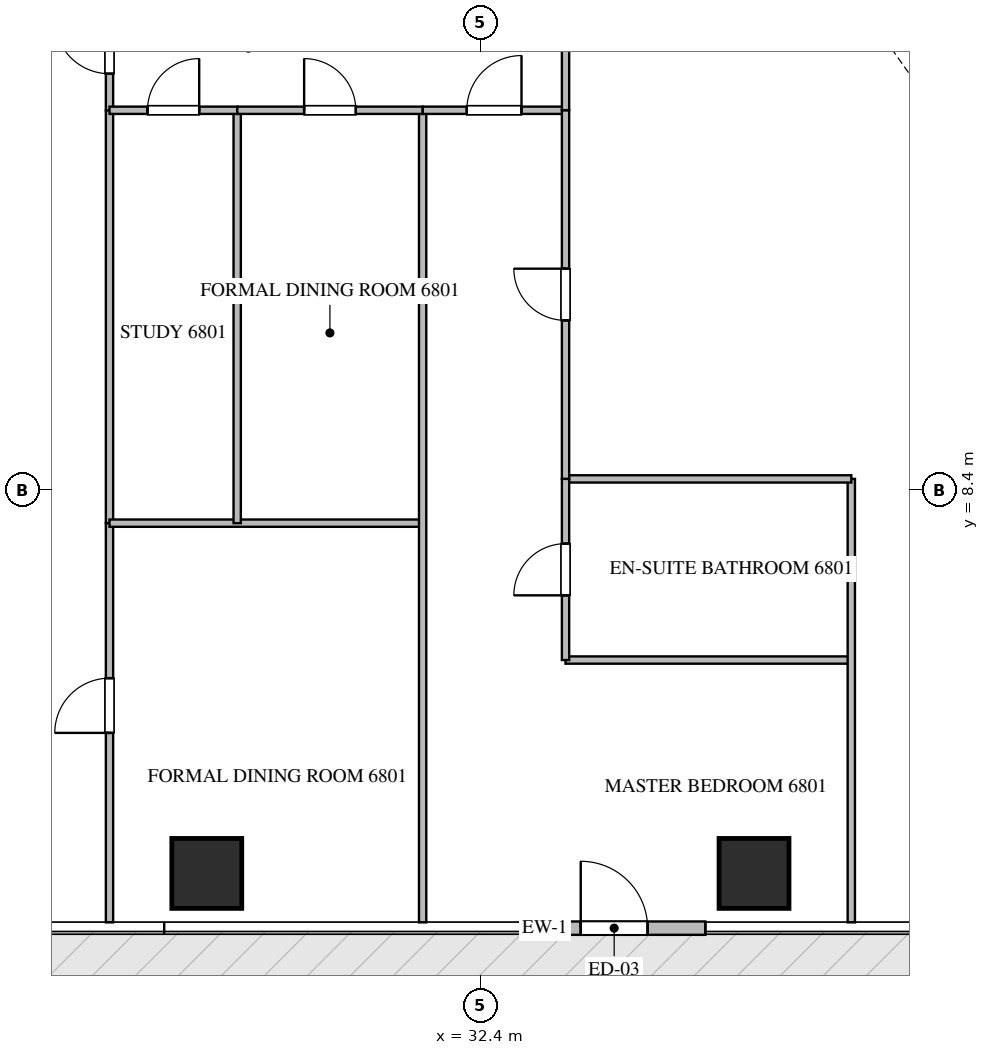
"""IFC4 building model, lengths in metres.
Left out: names, types, materials, properties, quantities, classifications, styles, units other than length and angle.
Written with IfcOpenShell. Run it as: python <this file> out.ifc"""

import sys

from ifc_helpers import new_model, si_unit, direction, frame, frame_2d, origin, origin_2d, place, context, subcontext, project, spatial, rectangle, extrude, source, transform, mapped, element, fill, save


model = new_model("IFC4")
c1 = context("Model", 3, precision=1e-05, world=origin(), true_north=direction((0.0, 1.0)))
c2 = subcontext(c1, "Body", "Model", "MODEL_VIEW")
j1 = project(units=[si_unit("LENGTHUNIT", "METRE"), si_unit("PLANEANGLEUNIT", "RADIAN")], contexts=[c1])
p1 = place(None, origin())
s1 = spatial("IfcSite", under=j1, at=p1, CompositionType="ELEMENT")
p2 = place(p1, origin())
s2 = spatial("IfcBuilding", under=s1, at=p2, CompositionType="ELEMENT")
p3 = place(p2, frame((0.0, 0.0, 272.05)))
s3 = spatial("IfcBuildingStorey", under=s2, at=p3, CompositionType="ELEMENT", Elevation=272.05)
m1 = source(origin(), c2, "Body", "SweptSolid", [
    extrude(rectangle(XDim=1.15, YDim=1.15, at=origin_2d()), origin(), (0.0, 0.0, 1.0), 3.85),
])
for number, where, z_axis, x_axis in (
    (1, (27.9, 2.1, -0.26), (0.0, 0.0, 1.0), (1.0, 0.0, 0.0)),
    (2, (36.9, 2.1, -0.26), (0.0, 0.0, 1.0), (1.0, 0.0, 0.0)),
):
    element("IfcColumn", number, at=place(p3, frame(where, z_axis=z_axis, x_axis=x_axis)), inside=s3, PredefinedType="COLUMN", context=c2, shape_type="MappedRepresentation", body=[
        mapped(m1, transform((0.0, 0.0, 0.0), scale=1.0)),
    ])
p4 = place(p3, frame((33.1, 1.2, 0.0), z_axis=(0.0, 0.0, 1.0), x_axis=(1.0, 0.0, 0.0)))
e3 = element("IfcWall", 3, at=p4, inside=s3, PredefinedType="ELEMENTEDWALL", context=c2, shape_type="SweptSolid", body=[
    extrude(rectangle(XDim=3.0, YDim=0.22, at=frame_2d((1.5, 0.0))), origin(), (0.0, 0.0, 1.0), 3.575),
])
p5 = place(p4, frame((0.95, 0.0, 0.0)))
e4 = element("IfcOpeningElement", 4, at=p5, cuts=e3, PredefinedType="OPENING", context=c2, shape_type="SweptSolid", body=[
    extrude(rectangle(XDim=1.1, YDim=2.2, at=frame_2d((0.55, 1.1))), frame((0.0, 0.12, 0.0), z_axis=(0.0, -1.0, 0.0), x_axis=(1.0, 0.0, 0.0)), (0.0, 0.0, 1.0), 0.24),
])
p6 = place(p3, frame((26.3, 14.65, 0.0), z_axis=(0.0, 0.0, 1.0), x_axis=(0.0, 1.0, 0.0)))
e5 = element("IfcWall", 5, at=p6, inside=s3, PredefinedType="PARTITIONING", context=c2, shape_type="SweptSolid", body=[
    extrude(rectangle(XDim=1.975, YDim=0.12, at=frame_2d((0.988, 0.0))), origin(), (0.0, 0.0, 1.0), 3.59),
])
p7 = place(p6, frame((0.601, 0.0, 0.0)))
e6 = element("IfcOpeningElement", 6, at=p7, cuts=e5, PredefinedType="OPENING", context=c2, shape_type="SweptSolid", body=[
    extrude(rectangle(XDim=0.9, YDim=2.1, at=frame_2d((0.45, 1.05))), frame((0.0, 0.07, 0.0), z_axis=(0.0, -1.0, 0.0), x_axis=(1.0, 0.0, 0.0)), (0.0, 0.0, 1.0), 0.14),
])
p8 = place(p3, frame((26.3, 1.295, 0.0), z_axis=(0.0, 0.0, 1.0), x_axis=(0.0, 1.0, 0.0)))
e7 = element("IfcWall", 7, at=p8, inside=s3, PredefinedType="PARTITIONING", context=c2, shape_type="SweptSolid", body=[
    extrude(rectangle(XDim=6.565, YDim=0.12, at=frame_2d((3.283, 0.0))), origin(), (0.0, 0.0, 1.0), 3.59),
])
p9 = place(p8, frame((3.116, 0.0, 0.0)))
e8 = element("IfcOpeningElement", 8, at=p9, cuts=e7, PredefinedType="OPENING", context=c2, shape_type="SweptSolid", body=[
    extrude(rectangle(XDim=0.9, YDim=2.1, at=frame_2d((0.45, 1.05))), frame((0.0, 0.07, 0.0), z_axis=(0.0, -1.0, 0.0), x_axis=(1.0, 0.0, 0.0)), (0.0, 0.0, 1.0), 0.14),
])
p10 = place(p3, frame((26.3, 7.862, 0.0), z_axis=(0.0, 0.0, 1.0), x_axis=(0.0, 1.0, 0.0)))
e9 = element("IfcWall", 9, at=p10, inside=s3, PredefinedType="PARTITIONING", context=c2, shape_type="SweptSolid", body=[
    extrude(rectangle(XDim=6.786, YDim=0.12, at=frame_2d((3.393, 0.0))), origin(), (0.0, 0.0, 1.0), 3.59),
])
p11 = place(p3, frame((26.3, 7.86, 0.0), z_axis=(0.0, 0.0, 1.0), x_axis=(1.0, 0.0, 0.0)))
e10 = element("IfcWall", 10, at=p11, inside=s3, PredefinedType="PARTITIONING", context=c2, shape_type="SweptSolid", body=[
    extrude(rectangle(XDim=5.15, YDim=0.12, at=frame_2d((2.575, 0.0))), origin(), (0.0, 0.0, 1.0), 3.59),
])
p12 = place(p3, frame((31.45, 1.295, 0.0), z_axis=(0.0, 0.0, 1.0), x_axis=(0.0, 1.0, 0.0)))
e11 = element("IfcWall", 11, at=p12, inside=s3, PredefinedType="PARTITIONING", context=c2, shape_type="SweptSolid", body=[
    extrude(rectangle(XDim=13.355, YDim=0.12, at=frame_2d((6.677, 0.0))), origin(), (0.0, 0.0, 1.0), 3.59),
])
p13 = place(p3, frame((28.4, 7.86, 0.0), z_axis=(0.0, 0.0, 1.0), x_axis=(0.0, 1.0, 0.0)))
e12 = element("IfcWall", 12, at=p13, inside=s3, PredefinedType="PARTITIONING", context=c2, shape_type="SweptSolid", body=[
    extrude(rectangle(XDim=6.79, YDim=0.12, at=frame_2d((3.395, 0.0))), origin(), (0.0, 0.0, 1.0), 3.59),
])
p14 = place(p3, frame((26.3, 14.65, 0.0), z_axis=(0.0, 0.0, 1.0), x_axis=(1.0, 0.0, 0.0)))
e13 = element("IfcWall", 13, at=p14, inside=s3, PredefinedType="PARTITIONING", context=c2, shape_type="SweptSolid", body=[
    extrude(rectangle(XDim=2.1, YDim=0.12, at=frame_2d((1.05, 0.0))), origin(), (0.0, 0.0, 1.0), 3.59),
])
p15 = place(p14, frame((0.625, 0.0, 0.0)))
e14 = element("IfcOpeningElement", 14, at=p15, cuts=e13, PredefinedType="OPENING", context=c2, shape_type="SweptSolid", body=[
    extrude(rectangle(XDim=0.85, YDim=2.1, at=frame_2d((0.425, 1.05))), frame((0.0, 0.07, 0.0), z_axis=(0.0, -1.0, 0.0), x_axis=(1.0, 0.0, 0.0)), (0.0, 0.0, 1.0), 0.14),
])
p16 = place(p3, frame((28.402, 14.65, 0.0), z_axis=(0.0, 0.0, 1.0), x_axis=(1.0, 0.0, 0.0)))
e15 = element("IfcWall", 15, at=p16, inside=s3, PredefinedType="PARTITIONING", context=c2, shape_type="SweptSolid", body=[
    extrude(rectangle(XDim=3.048, YDim=0.12, at=frame_2d((1.524, 0.0))), origin(), (0.0, 0.0, 1.0), 3.59),
])
p17 = place(p16, frame((1.099, 0.0, 0.0)))
e16 = element("IfcOpeningElement", 16, at=p17, cuts=e15, PredefinedType="OPENING", context=c2, shape_type="SweptSolid", body=[
    extrude(rectangle(XDim=0.85, YDim=2.1, at=frame_2d((0.425, 1.05))), frame((0.0, 0.07, 0.0), z_axis=(0.0, -1.0, 0.0), x_axis=(1.0, 0.0, 0.0)), (0.0, 0.0, 1.0), 0.14),
])
p18 = place(p3, frame((31.452, 14.65, 0.0), z_axis=(0.0, 0.0, 1.0), x_axis=(1.0, 0.0, 0.0)))
e17 = element("IfcWall", 17, at=p18, inside=s3, PredefinedType="PARTITIONING", context=c2, shape_type="SweptSolid", body=[
    extrude(rectangle(XDim=2.348, YDim=0.12, at=frame_2d((1.174, 0.0))), origin(), (0.0, 0.0, 1.0), 3.59),
])
p19 = place(p18, frame((0.724, 0.0, 0.0)))
e18 = element("IfcOpeningElement", 18, at=p19, cuts=e17, PredefinedType="OPENING", context=c2, shape_type="SweptSolid", body=[
    extrude(rectangle(XDim=0.9, YDim=2.1, at=frame_2d((0.45, 1.05))), frame((0.0, 0.07, 0.0), z_axis=(0.0, -1.0, 0.0), x_axis=(1.0, 0.0, 0.0)), (0.0, 0.0, 1.0), 0.14),
])
p20 = place(p3, frame((33.8, 5.609, 0.0), z_axis=(0.0, 0.0, 1.0), x_axis=(1.0, 0.0, 0.0)))
e19 = element("IfcWall", 19, at=p20, inside=s3, PredefinedType="PARTITIONING", context=c2, shape_type="SweptSolid", body=[
    extrude(rectangle(XDim=4.7, YDim=0.12, at=frame_2d((2.35, 0.0))), origin(), (0.0, 0.0, 1.0), 3.59),
])
p21 = place(p3, frame((38.5, 1.295, 0.0), z_axis=(0.0, 0.0, 1.0), x_axis=(0.0, 1.0, 0.0)))
e20 = element("IfcWall", 20, at=p21, inside=s3, PredefinedType="PARTITIONING", context=c2, shape_type="SweptSolid", body=[
    extrude(rectangle(XDim=7.293, YDim=0.12, at=frame_2d((3.646, 0.0))), origin(), (0.0, 0.0, 1.0), 3.59),
])
p22 = place(p3, frame((33.8, 8.588, 0.0), z_axis=(0.0, 0.0, 1.0), x_axis=(1.0, 0.0, 0.0)))
e21 = element("IfcWall", 21, at=p22, inside=s3, PredefinedType="PARTITIONING", context=c2, shape_type="SweptSolid", body=[
    extrude(rectangle(XDim=4.7, YDim=0.12, at=frame_2d((2.35, 0.0))), origin(), (0.0, 0.0, 1.0), 3.59),
])
p23 = place(p3, frame((33.8, 5.609, 0.0), z_axis=(0.0, 0.0, 1.0), x_axis=(0.0, 1.0, 0.0)))
e22 = element("IfcWall", 22, at=p23, inside=s3, PredefinedType="PARTITIONING", context=c2, shape_type="SweptSolid", body=[
    extrude(rectangle(XDim=2.979, YDim=0.12, at=frame_2d((1.49, 0.0))), origin(), (0.0, 0.0, 1.0), 3.59),
])
p24 = place(p23, frame((1.064, 0.0, 0.0)))
e23 = element("IfcOpeningElement", 23, at=p24, cuts=e22, PredefinedType="OPENING", context=c2, shape_type="SweptSolid", body=[
    extrude(rectangle(XDim=0.85, YDim=2.1, at=frame_2d((0.425, 1.05))), frame((0.0, 0.07, 0.0), z_axis=(0.0, -1.0, 0.0), x_axis=(1.0, 0.0, 0.0)), (0.0, 0.0, 1.0), 0.14),
])
p25 = place(p3, frame((33.8, 8.59, 0.0), z_axis=(0.0, 0.0, 1.0), x_axis=(0.0, 1.0, 0.0)))
e24 = element("IfcWall", 24, at=p25, inside=s3, PredefinedType="PARTITIONING", context=c2, shape_type="SweptSolid", body=[
    extrude(rectangle(XDim=6.06, YDim=0.12, at=frame_2d((3.03, 0.0))), origin(), (0.0, 0.0, 1.0), 3.59),
])
p26 = place(p25, frame((2.605, 0.0, 0.0)))
e25 = element("IfcOpeningElement", 25, at=p26, cuts=e24, PredefinedType="OPENING", context=c2, shape_type="SweptSolid", body=[
    extrude(rectangle(XDim=0.85, YDim=2.1, at=frame_2d((0.425, 1.05))), frame((0.0, 0.07, 0.0), z_axis=(0.0, -1.0, 0.0), x_axis=(1.0, 0.0, 0.0)), (0.0, 0.0, 1.0), 0.14),
])
p27 = place(p3, frame((33.8, 14.652, 0.0), z_axis=(0.0, 0.0, 1.0), x_axis=(0.0, 1.0, 0.0)))
e26 = element("IfcWall", 26, at=p27, inside=s3, PredefinedType="PARTITIONING", context=c2, shape_type="SweptSolid", body=[
    extrude(rectangle(XDim=1.973, YDim=0.12, at=frame_2d((0.986, 0.0))), origin(), (0.0, 0.0, 1.0), 3.59),
])
m2 = source(origin(), c2, "Body", "SweptSolid", [
    extrude(rectangle(XDim=1.1, YDim=2.2, at=frame_2d((0.55, 1.1))), frame((0.0, 0.025, 0.0), z_axis=(0.0, -1.0, 0.0), x_axis=(1.0, 0.0, 0.0)), (0.0, 0.0, 1.0), 0.05),
])
p28 = place(p5, origin())
e27 = element("IfcDoor", 27, at=p28, inside=s3, OperationType="SINGLE_SWING_LEFT", PredefinedType="DOOR", context=c2, shape_type="MappedRepresentation", body=[
    mapped(m2, transform((0.0, 0.0, 0.0), scale=1.0)),
])
fill(e4, e27)
m3 = source(origin(), c2, "Body", "SweptSolid", [
    extrude(rectangle(XDim=0.9, YDim=2.1, at=frame_2d((0.45, 1.05))), frame((0.0, 0.025, 0.0), z_axis=(0.0, -1.0, 0.0), x_axis=(1.0, 0.0, 0.0)), (0.0, 0.0, 1.0), 0.05),
])
p29 = place(p7, origin())
e28 = element("IfcDoor", 28, at=p29, inside=s3, OperationType="SINGLE_SWING_RIGHT", PredefinedType="DOOR", context=c2, shape_type="MappedRepresentation", body=[
    mapped(m3, transform((0.0, 0.0, 0.0), scale=1.0)),
])
fill(e6, e28)
p30 = place(p9, origin())
e29 = element("IfcDoor", 29, at=p30, inside=s3, OperationType="SINGLE_SWING_LEFT", PredefinedType="DOOR", context=c2, shape_type="MappedRepresentation", body=[
    mapped(m3, transform((0.0, 0.0, 0.0), scale=1.0)),
])
fill(e8, e29)
m4 = source(origin(), c2, "Body", "SweptSolid", [
    extrude(rectangle(XDim=0.85, YDim=2.1, at=frame_2d((0.425, 1.05))), frame((0.0, 0.025, 0.0), z_axis=(0.0, -1.0, 0.0), x_axis=(1.0, 0.0, 0.0)), (0.0, 0.0, 1.0), 0.05),
])
p31 = place(p15, origin())
e30 = element("IfcDoor", 30, at=p31, inside=s3, OperationType="SINGLE_SWING_RIGHT", PredefinedType="DOOR", context=c2, shape_type="MappedRepresentation", body=[
    mapped(m4, transform((0.0, 0.0, 0.0), scale=1.0)),
])
fill(e14, e30)
p32 = place(p17, origin())
e31 = element("IfcDoor", 31, at=p32, inside=s3, OperationType="SINGLE_SWING_LEFT", PredefinedType="DOOR", context=c2, shape_type="MappedRepresentation", body=[
    mapped(m4, transform((0.0, 0.0, 0.0), scale=1.0)),
])
fill(e16, e31)
p33 = place(p19, origin())
e32 = element("IfcDoor", 32, at=p33, inside=s3, OperationType="SINGLE_SWING_RIGHT", PredefinedType="DOOR", context=c2, shape_type="MappedRepresentation", body=[
    mapped(m3, transform((0.0, 0.0, 0.0), scale=1.0)),
])
fill(e18, e32)
p34 = place(p24, origin())
e33 = element("IfcDoor", 33, at=p34, inside=s3, OperationType="SINGLE_SWING_LEFT", PredefinedType="DOOR", context=c2, shape_type="MappedRepresentation", body=[
    mapped(m4, transform((0.0, 0.0, 0.0), scale=1.0)),
])
fill(e23, e33)
p35 = place(p26, origin())
e34 = element("IfcDoor", 34, at=p35, inside=s3, OperationType="SINGLE_SWING_RIGHT", PredefinedType="DOOR", context=c2, shape_type="MappedRepresentation", body=[
    mapped(m4, transform((0.0, 0.0, 0.0), scale=1.0)),
])
fill(e25, e34)
save(model, sys.argv[1])
